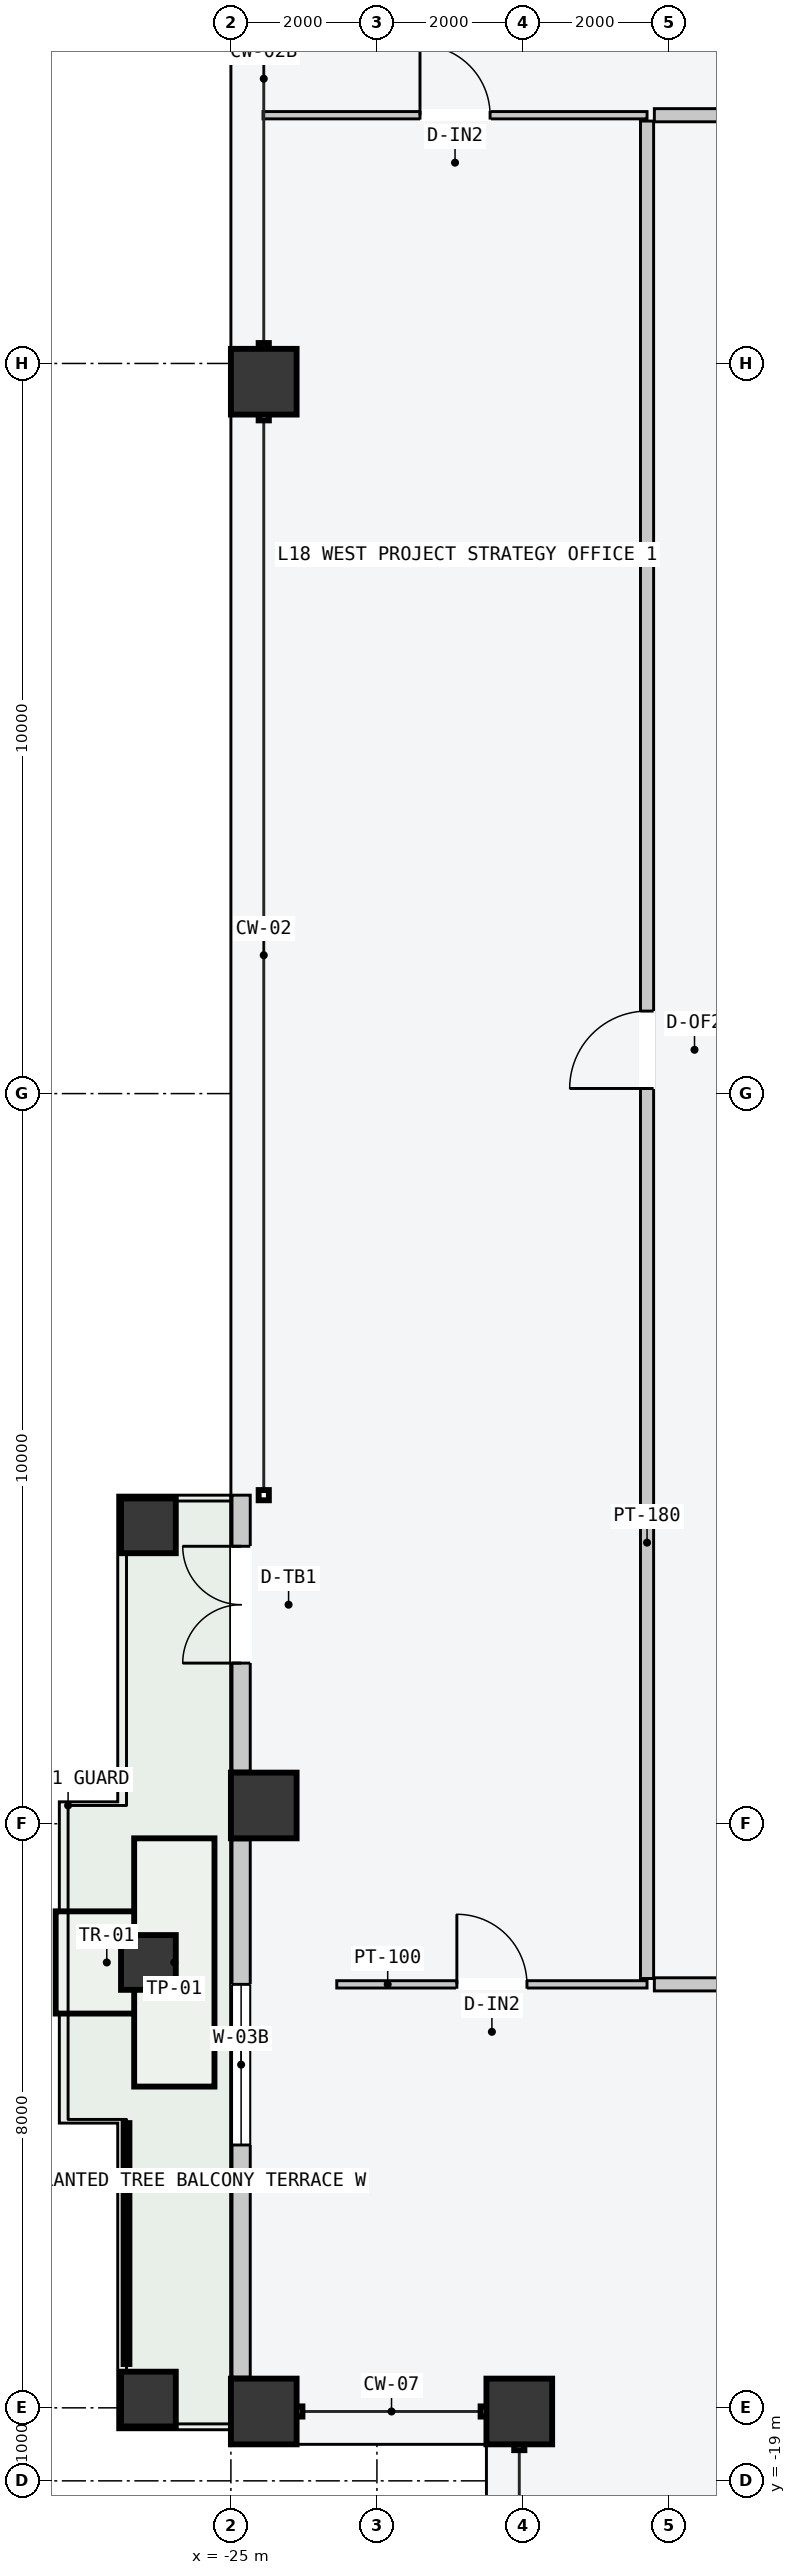
"""IFC4 building model, lengths in metres.
Left out: names, types, materials, properties, quantities, classifications, styles, units other than length and angle.
Written with IfcOpenShell. Run it as: python <this file> out.ifc"""

import sys

from ifc_helpers import new_model, si_unit, direction, frame, frame_2d, origin, origin_2d, place, context, subcontext, project, spatial, rectangle, hollow_rectangle, extrude, element, fill, save


model = new_model("IFC4")
c1 = context("Model", 3, precision=1e-05, world=origin(), true_north=direction((0.0, 1.0)))
c2 = subcontext(c1, "Body", "Model", "MODEL_VIEW")
j1 = project(units=[si_unit("LENGTHUNIT", "METRE"), si_unit("PLANEANGLEUNIT", "RADIAN")], contexts=[c1])
p1 = place(None, origin())
s1 = spatial("IfcSite", under=j1, at=p1, CompositionType="ELEMENT")
p2 = place(p1, origin())
s2 = spatial("IfcBuilding", under=s1, at=p2, CompositionType="ELEMENT")
p3 = place(p2, frame((0.0, 0.0, 70.8)))
s3 = spatial("IfcBuildingStorey", under=s2, at=p3, CompositionType="ELEMENT", Elevation=70.8)
for number, where, z_axis, x_axis in (
    (1, (-24.55, -18.05, 0.0), (0.0, 0.0, 1.0), (0.0, 1.0, 0.0)),
    (2, (-24.55, -9.75, 0.0), (0.0, 0.0, 1.0), (0.0, 1.0, 0.0)),
    (3, (-24.55, 9.75, 0.0), (0.0, 0.0, 1.0), (0.0, 1.0, 0.0)),
    (4, (-21.05, -18.05, 0.0), (0.0, 0.0, 1.0), (1.0, 0.0, 0.0)),
):
    element("IfcColumn", number, at=place(p3, frame(where, z_axis=z_axis, x_axis=x_axis)), inside=s3, PredefinedType="COLUMN", context=c2, shape_type="SweptSolid", body=[
        extrude(hollow_rectangle(XDim=0.9, YDim=0.9, WallThickness=0.045, at=origin_2d()), origin(), (0.0, 0.0, 1.0), 3.6),
    ])
for number, where, z_axis, x_axis in (
    (5, (-26.13, -17.88, 0.0), (0.0, 0.0, 1.0), (0.0, 1.0, 0.0)),
    (6, (-26.13, -5.92, 0.0), (0.0, 0.0, 1.0), (0.0, 1.0, 0.0)),
    (7, (-26.13, -11.9, 0.0), (0.0, 0.0, 1.0), (0.0, 1.0, 0.0)),
):
    element("IfcColumn", number, at=place(p3, frame(where, z_axis=z_axis, x_axis=x_axis)), inside=s3, PredefinedType="COLUMN", context=c2, shape_type="SweptSolid", body=[
        extrude(hollow_rectangle(XDim=0.75, YDim=0.75, WallThickness=0.032, at=origin_2d()), origin(), (0.0, 0.0, 1.0), 3.6),
    ])
p4 = place(p3, frame((-24.86, -17.58, 0.0), z_axis=(0.0, 0.0, 1.0), x_axis=(0.0, 1.0, 0.0)))
e8 = element("IfcWall", 8, at=p4, inside=s3, PredefinedType="STANDARD", context=c2, shape_type="SweptSolid", body=[
    extrude(rectangle(XDim=7.36, YDim=0.25, at=frame_2d((3.68, 0.0))), origin(), (0.0, 0.0, 1.0), 3.4),
])
p5 = place(p4, frame((3.18, 0.0, 0.85)))
e9 = element("IfcOpeningElement", 9, at=p5, cuts=e8, PredefinedType="OPENING", context=c2, shape_type="SweptSolid", body=[
    extrude(rectangle(XDim=2.2, YDim=2.1, at=frame_2d((1.1, 1.05))), frame((0.0, 0.135, 0.0), z_axis=(0.0, -1.0, 0.0), x_axis=(1.0, 0.0, 0.0)), (0.0, 0.0, 1.0), 0.27),
])
p6 = place(p3, frame((-24.86, -9.28, 0.0), z_axis=(0.0, 0.0, 1.0), x_axis=(0.0, 1.0, 0.0)))
e10 = element("IfcWall", 10, at=p6, inside=s3, PredefinedType="STANDARD", context=c2, shape_type="SweptSolid", body=[
    extrude(rectangle(XDim=3.78, YDim=0.25, at=frame_2d((1.89, 0.0))), origin(), (0.0, 0.0, 1.0), 3.4),
])
p7 = place(p6, frame((1.48, 0.0, 0.0)))
e11 = element("IfcOpeningElement", 11, at=p7, cuts=e10, PredefinedType="OPENING", context=c2, shape_type="SweptSolid", body=[
    extrude(rectangle(XDim=1.6, YDim=2.2, at=frame_2d((0.8, 1.1))), frame((0.0, 0.135, 0.0), z_axis=(0.0, -1.0, 0.0), x_axis=(1.0, 0.0, 0.0)), (0.0, 0.0, 1.0), 0.27),
])
p8 = place(p3, frame((-19.2, 13.4, 0.0), z_axis=(0.0, 0.0, 1.0), x_axis=(1.0, 0.0, 0.0)))
e12 = element("IfcWall", 12, at=p8, inside=s3, PredefinedType="PARTITIONING", context=c2, shape_type="SweptSolid", body=[
    extrude(rectangle(XDim=38.4, YDim=0.18, at=frame_2d((19.2, 0.0))), origin(), (0.0, 0.0, 1.0), 3.4),
])
p9 = place(p8, frame((4.113, 0.0, 0.0)))
e13 = element("IfcOpeningElement", 13, at=p9, cuts=e12, PredefinedType="OPENING", context=c2, shape_type="SweptSolid", body=[
    extrude(rectangle(XDim=1.02, YDim=2.2, at=frame_2d((0.51, 1.1))), frame((0.0, 0.1, 0.0), z_axis=(0.0, -1.0, 0.0), x_axis=(1.0, 0.0, 0.0)), (0.0, 0.0, 1.0), 0.2),
])
p10 = place(p8, frame((13.095, 0.0, 0.0)))
e14 = element("IfcOpeningElement", 14, at=p10, cuts=e12, PredefinedType="OPENING", context=c2, shape_type="SweptSolid", body=[
    extrude(rectangle(XDim=1.06, YDim=2.2, at=frame_2d((0.53, 1.1))), frame((0.0, 0.1, 0.0), z_axis=(0.0, -1.0, 0.0), x_axis=(1.0, 0.0, 0.0)), (0.0, 0.0, 1.0), 0.2),
])
p11 = place(p8, frame((21.168, 0.0, 0.0)))
e15 = element("IfcOpeningElement", 15, at=p11, cuts=e12, PredefinedType="OPENING", context=c2, shape_type="SweptSolid", body=[
    extrude(rectangle(XDim=1.24, YDim=2.24, at=frame_2d((0.62, 1.12))), frame((0.0, 0.1, 0.0), z_axis=(0.0, -1.0, 0.0), x_axis=(1.0, 0.0, 0.0)), (0.0, 0.0, 1.0), 0.2),
])
p12 = place(p8, frame((28.455, 0.0, 0.0)))
e16 = element("IfcOpeningElement", 16, at=p12, cuts=e12, PredefinedType="OPENING", context=c2, shape_type="SweptSolid", body=[
    extrude(rectangle(XDim=1.4, YDim=2.2, at=frame_2d((0.7, 1.1))), frame((0.0, 0.1, 0.0), z_axis=(0.0, -1.0, 0.0), x_axis=(1.0, 0.0, 0.0)), (0.0, 0.0, 1.0), 0.2),
])
p13 = place(p8, frame((35.119, 0.0, 0.0)))
e17 = element("IfcOpeningElement", 17, at=p13, cuts=e12, PredefinedType="OPENING", context=c2, shape_type="SweptSolid", body=[
    extrude(rectangle(XDim=0.9, YDim=2.15, at=frame_2d((0.45, 1.075))), frame((0.0, 0.1, 0.0), z_axis=(0.0, -1.0, 0.0), x_axis=(1.0, 0.0, 0.0)), (0.0, 0.0, 1.0), 0.2),
])
p14 = place(p3, frame((-24.56, 13.4, 0.0), z_axis=(0.0, 0.0, 1.0), x_axis=(1.0, 0.0, 0.0)))
e18 = element("IfcWall", 18, at=p14, inside=s3, PredefinedType="PARTITIONING", context=c2, shape_type="SweptSolid", body=[
    extrude(rectangle(XDim=5.26, YDim=0.1, at=frame_2d((2.63, 0.0))), origin(), (0.0, 0.0, 1.0), 3.4),
])
p15 = place(p14, frame((2.15, 0.0, 0.0)))
e19 = element("IfcOpeningElement", 19, at=p15, cuts=e18, PredefinedType="OPENING", context=c2, shape_type="SweptSolid", body=[
    extrude(rectangle(XDim=0.96, YDim=2.18, at=frame_2d((0.48, 1.09))), frame((0.0, 0.06, 0.0), z_axis=(0.0, -1.0, 0.0), x_axis=(1.0, 0.0, 0.0)), (0.0, 0.0, 1.0), 0.12),
])
p16 = place(p3, frame((-19.2, -12.2, 0.0), z_axis=(0.0, 0.0, 1.0), x_axis=(1.0, 0.0, 0.0)))
e20 = element("IfcWall", 20, at=p16, inside=s3, PredefinedType="PARTITIONING", context=c2, shape_type="SweptSolid", body=[
    extrude(rectangle(XDim=38.4, YDim=0.18, at=frame_2d((19.2, 0.0))), origin(), (0.0, 0.0, 1.0), 3.4),
])
p17 = place(p16, frame((7.307, 0.0, 0.0)))
e21 = element("IfcOpeningElement", 21, at=p17, cuts=e20, PredefinedType="OPENING", context=c2, shape_type="SweptSolid", body=[
    extrude(rectangle(XDim=1.4, YDim=2.2, at=frame_2d((0.7, 1.1))), frame((0.0, 0.1, 0.0), z_axis=(0.0, -1.0, 0.0), x_axis=(1.0, 0.0, 0.0)), (0.0, 0.0, 1.0), 0.2),
])
p18 = place(p16, frame((26.757, 0.0, 0.0)))
e22 = element("IfcOpeningElement", 22, at=p18, cuts=e20, PredefinedType="OPENING", context=c2, shape_type="SweptSolid", body=[
    extrude(rectangle(XDim=0.9, YDim=2.15, at=frame_2d((0.45, 1.075))), frame((0.0, 0.1, 0.0), z_axis=(0.0, -1.0, 0.0), x_axis=(1.0, 0.0, 0.0)), (0.0, 0.0, 1.0), 0.2),
])
p19 = place(p3, frame((-23.55, -12.2, 0.0), z_axis=(0.0, 0.0, 1.0), x_axis=(1.0, 0.0, 0.0)))
e23 = element("IfcWall", 23, at=p19, inside=s3, PredefinedType="PARTITIONING", context=c2, shape_type="SweptSolid", body=[
    extrude(rectangle(XDim=4.25, YDim=0.1, at=frame_2d((2.125, 0.0))), origin(), (0.0, 0.0, 1.0), 3.4),
])
p20 = place(p19, frame((1.645, 0.0, 0.0)))
e24 = element("IfcOpeningElement", 24, at=p20, cuts=e23, PredefinedType="OPENING", context=c2, shape_type="SweptSolid", body=[
    extrude(rectangle(XDim=0.96, YDim=2.18, at=frame_2d((0.48, 1.09))), frame((0.0, 0.06, 0.0), z_axis=(0.0, -1.0, 0.0), x_axis=(1.0, 0.0, 0.0)), (0.0, 0.0, 1.0), 0.12),
])
p21 = place(p3, frame((-19.3, -12.12, 0.0), z_axis=(0.0, 0.0, 1.0), x_axis=(0.0, 1.0, 0.0)))
e25 = element("IfcWall", 25, at=p21, inside=s3, PredefinedType="PARTITIONING", context=c2, shape_type="SweptSolid", body=[
    extrude(rectangle(XDim=25.44, YDim=0.18, at=frame_2d((12.72, 0.0))), origin(), (0.0, 0.0, 1.0), 3.4),
])
p22 = place(p21, frame((12.19, 0.0, 0.0)))
e26 = element("IfcOpeningElement", 26, at=p22, cuts=e25, PredefinedType="OPENING", context=c2, shape_type="SweptSolid", body=[
    extrude(rectangle(XDim=1.06, YDim=2.2, at=frame_2d((0.53, 1.1))), frame((0.0, 0.1, 0.0), z_axis=(0.0, -1.0, 0.0), x_axis=(1.0, 0.0, 0.0)), (0.0, 0.0, 1.0), 0.2),
])
p23 = place(p5, origin())
e27 = element("IfcWindow", 27, at=p23, inside=s3, PartitioningType="SINGLE_PANEL", PredefinedType="WINDOW", context=c2, shape_type="SweptSolid", body=[
    extrude(rectangle(XDim=2.2, YDim=2.1, at=frame_2d((1.1, 1.05))), frame((0.0, 0.03, 0.0), z_axis=(0.0, -1.0, 0.0), x_axis=(1.0, 0.0, 0.0)), (0.0, 0.0, 1.0), 0.06),
])
fill(e9, e27)
p24 = place(p7, origin())
e28 = element("IfcDoor", 28, at=p24, inside=s3, OperationType="DOUBLE_DOOR_SINGLE_SWING", PredefinedType="DOOR", context=c2, shape_type="SweptSolid", body=[
    extrude(rectangle(XDim=1.6, YDim=2.2, at=frame_2d((0.8, 1.1))), frame((0.0, 0.025, 0.0), z_axis=(0.0, -1.0, 0.0), x_axis=(1.0, 0.0, 0.0)), (0.0, 0.0, 1.0), 0.05),
])
fill(e11, e28)
p25 = place(p15, origin())
e29 = element("IfcDoor", 29, at=p25, inside=s3, OperationType="SINGLE_SWING_LEFT", PredefinedType="DOOR", context=c2, shape_type="SweptSolid", body=[
    extrude(rectangle(XDim=0.96, YDim=2.18, at=frame_2d((0.48, 1.09))), frame((0.0, 0.025, 0.0), z_axis=(0.0, -1.0, 0.0), x_axis=(1.0, 0.0, 0.0)), (0.0, 0.0, 1.0), 0.05),
])
fill(e19, e29)
p26 = place(p20, origin())
e30 = element("IfcDoor", 30, at=p26, inside=s3, OperationType="SINGLE_SWING_LEFT", PredefinedType="DOOR", context=c2, shape_type="SweptSolid", body=[
    extrude(rectangle(XDim=0.96, YDim=2.18, at=frame_2d((0.48, 1.09))), frame((0.0, 0.025, 0.0), z_axis=(0.0, -1.0, 0.0), x_axis=(1.0, 0.0, 0.0)), (0.0, 0.0, 1.0), 0.05),
])
fill(e24, e30)
p27 = place(p22, origin())
e31 = element("IfcDoor", 31, at=p27, inside=s3, OperationType="SINGLE_SWING_LEFT", PredefinedType="DOOR", context=c2, shape_type="SweptSolid", body=[
    extrude(rectangle(XDim=1.06, YDim=2.2, at=frame_2d((0.53, 1.1))), frame((0.0, 0.025, 0.0), z_axis=(0.0, -1.0, 0.0), x_axis=(1.0, 0.0, 0.0)), (0.0, 0.0, 1.0), 0.05),
])
fill(e26, e31)
save(model, sys.argv[1])
